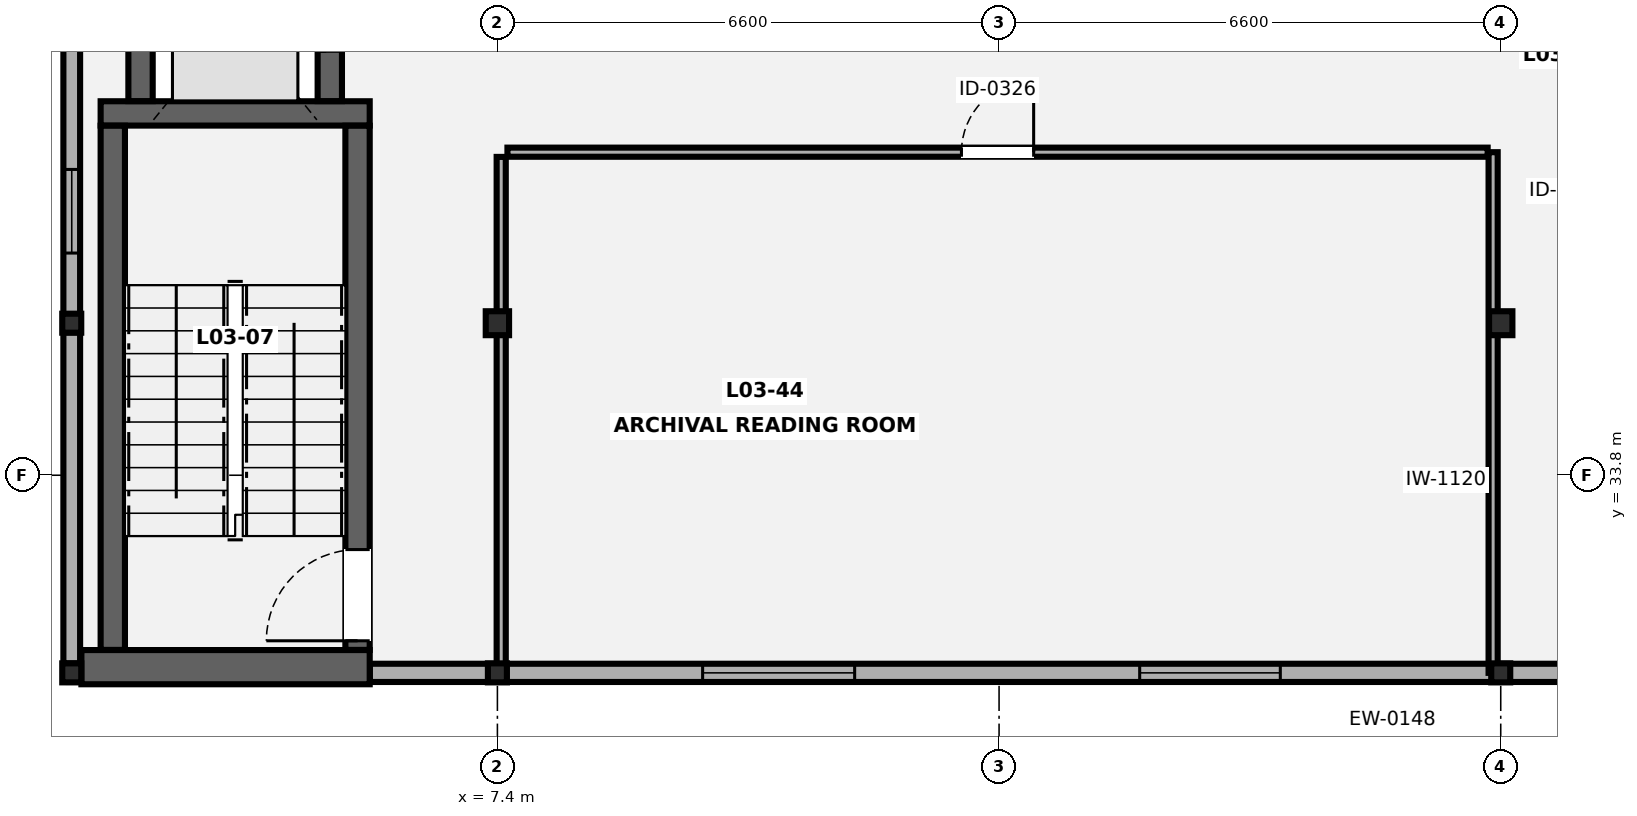
"""IFC4 building model, lengths in metres.
Left out: names, types, materials, properties, quantities, classifications, styles, units other than length and angle.
Written with IfcOpenShell. Run it as: python <this file> out.ifc"""

import sys

from ifc_helpers import new_model, si_unit, direction, frame, frame_2d, origin, origin_2d, place, context, subcontext, project, spatial, rectangle, hollow_rectangle, i_section, extrude, element, fill, save


model = new_model("IFC4")
c1 = context("Model", 3, precision=1e-05, world=origin(), true_north=direction((0.0, 1.0)))
c2 = subcontext(c1, "Body", "Model", "MODEL_VIEW")
j1 = project(units=[si_unit("LENGTHUNIT", "METRE"), si_unit("PLANEANGLEUNIT", "RADIAN")], contexts=[c1])
p1 = place(None, origin())
s1 = spatial("IfcSite", under=j1, at=p1, CompositionType="ELEMENT")
p2 = place(p1, origin())
s2 = spatial("IfcBuilding", under=s1, at=p2, CompositionType="ELEMENT")
p3 = place(p2, frame((0.0, 0.0, 13.3)))
s3 = spatial("IfcBuildingStorey", under=s2, at=p3, CompositionType="ELEMENT", Elevation=13.3)
for number, where, z_axis, x_axis in (
    (1, (1.8, 31.2, 0.0), (0.0, 0.0, 1.0), (1.0, 0.0, 0.0)),
    (2, (1.8, 35.8, 0.0), (0.0, 0.0, 1.0), (1.0, 0.0, 0.0)),
    (3, (7.4, 31.2, 0.0), (0.0, 0.0, 1.0), (1.0, 0.0, 0.0)),
):
    element("IfcColumn", number, at=place(p3, frame(where, z_axis=z_axis, x_axis=x_axis)), inside=s3, PredefinedType="COLUMN", context=c2, shape_type="SweptSolid", body=[
        extrude(hollow_rectangle(XDim=0.25, YDim=0.25, WallThickness=0.012, at=origin_2d()), origin(), (0.0, 0.0, 1.0), 4.2),
    ])
p4 = place(p3, frame((7.4, 35.8, 0.0), z_axis=(0.0, 0.0, 1.0), x_axis=(1.0, 0.0, 0.0)))
e4 = element("IfcColumn", 4, at=p4, inside=s3, PredefinedType="COLUMN", context=c2, shape_type="SweptSolid", body=[
    extrude(i_section(OverallWidth=0.307, OverallDepth=0.315, WebThickness=0.012, FlangeThickness=0.019, FilletRadius=0.017, at=origin_2d()), origin(), (0.0, 0.0, 1.0), 4.2),
])
p5 = place(p3, frame((20.6, 31.2, 0.0), z_axis=(0.0, 0.0, 1.0), x_axis=(1.0, 0.0, 0.0)))
e5 = element("IfcColumn", 5, at=p5, inside=s3, PredefinedType="COLUMN", context=c2, shape_type="SweptSolid", body=[
    extrude(hollow_rectangle(XDim=0.25, YDim=0.25, WallThickness=0.012, at=origin_2d()), origin(), (0.0, 0.0, 1.0), 4.2),
])
p6 = place(p3, frame((20.6, 35.8, 0.0), z_axis=(0.0, 0.0, 1.0), x_axis=(1.0, 0.0, 0.0)))
e6 = element("IfcColumn", 6, at=p6, inside=s3, PredefinedType="COLUMN", context=c2, shape_type="SweptSolid", body=[
    extrude(i_section(OverallWidth=0.307, OverallDepth=0.315, WebThickness=0.012, FlangeThickness=0.019, FilletRadius=0.017, at=origin_2d()), origin(), (0.0, 0.0, 1.0), 4.2),
])
p7 = place(p3, frame((1.8, 31.323, 0.0), z_axis=(0.0, 0.0, 1.0), x_axis=(0.0, 1.0, 0.0)))
e7 = element("IfcWall", 7, at=p7, inside=s3, PredefinedType="SOLIDWALL", context=c2, shape_type="SweptSolid", body=[
    extrude(rectangle(XDim=8.954, YDim=0.22, at=frame_2d((4.477, 0.0))), origin(), (0.0, 0.0, 1.0), 3.445),
])
p8 = place(p7, frame((5.4, 0.0, 0.85)))
e8 = element("IfcOpeningElement", 8, at=p8, cuts=e7, PredefinedType="OPENING", context=c2, shape_type="SweptSolid", body=[
    extrude(rectangle(XDim=1.1, YDim=1.4, at=frame_2d((0.55, 0.7))), frame((0.0, 0.12, 0.0), z_axis=(0.0, -1.0, 0.0), x_axis=(1.0, 0.0, 0.0)), (0.0, 0.0, 1.0), 0.24),
])
p9 = place(p3, frame((27.077, 31.2, 0.0), z_axis=(0.0, 0.0, 1.0), x_axis=(-1.0, 0.0, 0.0)))
e9 = element("IfcWall", 9, at=p9, inside=s3, PredefinedType="SOLIDWALL", context=c2, shape_type="SweptSolid", body=[
    extrude(rectangle(XDim=21.355, YDim=0.24, at=frame_2d((10.677, 0.0))), origin(), (0.0, 0.0, 1.0), 3.505),
])
p10 = place(p9, frame((9.377, 0.0, 0.85)))
e10 = element("IfcOpeningElement", 10, at=p10, cuts=e9, PredefinedType="OPENING", context=c2, shape_type="SweptSolid", body=[
    extrude(rectangle(XDim=1.85, YDim=1.4, at=frame_2d((0.925, 0.7))), frame((0.0, 0.13, 0.0), z_axis=(0.0, -1.0, 0.0), x_axis=(1.0, 0.0, 0.0)), (0.0, 0.0, 1.0), 0.26),
])
p11 = place(p9, frame((14.977, 0.0, 0.85)))
e11 = element("IfcOpeningElement", 11, at=p11, cuts=e9, PredefinedType="OPENING", context=c2, shape_type="SweptSolid", body=[
    extrude(rectangle(XDim=2.0, YDim=1.4, at=frame_2d((1.0, 0.7))), frame((0.0, 0.13, 0.0), z_axis=(0.0, -1.0, 0.0), x_axis=(1.0, 0.0, 0.0)), (0.0, 0.0, 1.0), 0.26),
])
p12 = place(p3, frame((1.927, 31.275, 0.0), z_axis=(0.0, 0.0, 1.0), x_axis=(1.0, 0.0, 0.0)))
e12 = element("IfcWall", 12, at=p12, inside=s3, PredefinedType="SHEAR", context=c2, shape_type="SweptSolid", body=[
    extrude(rectangle(XDim=3.793, YDim=0.45, at=frame_2d((1.896, 0.0))), origin(), (0.0, 0.0, 1.0), 4.0),
])
p13 = place(p3, frame((2.18, 38.56, 0.0), z_axis=(0.0, 0.0, 1.0), x_axis=(1.0, 0.0, 0.0)))
e13 = element("IfcWall", 13, at=p13, inside=s3, PredefinedType="SHEAR", context=c2, shape_type="SweptSolid", body=[
    extrude(rectangle(XDim=3.54, YDim=0.32, at=frame_2d((1.77, 0.0))), origin(), (0.0, 0.0, 1.0), 4.0),
])
p14 = place(p3, frame((2.34, 31.502, 0.0), z_axis=(0.0, 0.0, 1.0), x_axis=(0.0, 1.0, 0.0)))
e14 = element("IfcWall", 14, at=p14, inside=s3, PredefinedType="SHEAR", context=c2, shape_type="SweptSolid", body=[
    extrude(rectangle(XDim=6.896, YDim=0.32, at=frame_2d((3.448, 0.0))), origin(), (0.0, 0.0, 1.0), 4.0),
])
p15 = place(p3, frame((5.56, 31.502, 0.0), z_axis=(0.0, 0.0, 1.0), x_axis=(0.0, 1.0, 0.0)))
e15 = element("IfcWall", 15, at=p15, inside=s3, PredefinedType="SHEAR", context=c2, shape_type="SweptSolid", body=[
    extrude(rectangle(XDim=6.896, YDim=0.32, at=frame_2d((3.448, 0.0))), origin(), (0.0, 0.0, 1.0), 4.0),
])
p16 = place(p15, frame((0.12, 0.0, 0.0)))
e16 = element("IfcOpeningElement", 16, at=p16, cuts=e15, PredefinedType="OPENING", context=c2, shape_type="SweptSolid", body=[
    extrude(rectangle(XDim=1.2, YDim=2.15, at=frame_2d((0.6, 1.075))), frame((0.0, 0.17, 0.0), z_axis=(0.0, -1.0, 0.0), x_axis=(1.0, 0.0, 0.0)), (0.0, 0.0, 1.0), 0.34),
])
p17 = place(p3, frame((2.705, 38.722, 0.0), z_axis=(0.0, 0.0, 1.0), x_axis=(0.0, 1.0, 0.0)))
e17 = element("IfcWall", 17, at=p17, inside=s3, PredefinedType="SHEAR", context=c2, shape_type="SweptSolid", body=[
    extrude(rectangle(XDim=2.411, YDim=0.32, at=frame_2d((1.206, 0.0))), origin(), (0.0, 0.0, 1.0), 4.0),
])
p18 = place(p3, frame((5.195, 38.722, 0.0), z_axis=(0.0, 0.0, 1.0), x_axis=(0.0, 1.0, 0.0)))
e18 = element("IfcWall", 18, at=p18, inside=s3, PredefinedType="SHEAR", context=c2, shape_type="SweptSolid", body=[
    extrude(rectangle(XDim=2.411, YDim=0.32, at=frame_2d((1.206, 0.0))), origin(), (0.0, 0.0, 1.0), 4.0),
])
p19 = place(p18, frame((0.656, 0.0, 0.0)))
e19 = element("IfcOpeningElement", 19, at=p19, cuts=e18, PredefinedType="OPENING", context=c2, shape_type="SweptSolid", body=[
    extrude(rectangle(XDim=1.1, YDim=2.15, at=frame_2d((0.55, 1.075))), frame((0.0, 0.17, 0.0), z_axis=(0.0, -1.0, 0.0), x_axis=(1.0, 0.0, 0.0)), (0.0, 0.0, 1.0), 0.34),
])
p20 = place(p3, frame((7.532, 38.05, 0.0), z_axis=(0.0, 0.0, 1.0), x_axis=(1.0, 0.0, 0.0)))
e20 = element("IfcWall", 20, at=p20, inside=s3, PredefinedType="PARTITIONING", context=c2, shape_type="SweptSolid", body=[
    extrude(rectangle(XDim=12.896, YDim=0.12, at=frame_2d((6.448, 0.0))), origin(), (0.0, 0.0, 1.0), 3.598),
])
p21 = place(p20, frame((5.973, 0.0, 0.0)))
e21 = element("IfcOpeningElement", 21, at=p21, cuts=e20, PredefinedType="OPENING", context=c2, shape_type="SweptSolid", body=[
    extrude(rectangle(XDim=0.95, YDim=2.1, at=frame_2d((0.475, 1.05))), frame((0.0, 0.07, 0.0), z_axis=(0.0, -1.0, 0.0), x_axis=(1.0, 0.0, 0.0)), (0.0, 0.0, 1.0), 0.14),
])
p22 = place(p3, frame((7.45, 31.2, 0.0), z_axis=(0.0, 0.0, 1.0), x_axis=(0.0, 1.0, 0.0)))
e22 = element("IfcWall", 22, at=p22, inside=s3, PredefinedType="PARTITIONING", context=c2, shape_type="SweptSolid", body=[
    extrude(rectangle(XDim=6.788, YDim=0.12, at=frame_2d((3.394, 0.0))), origin(), (0.0, 0.0, 1.0), 3.445),
])
p23 = place(p3, frame((20.5, 31.2, 0.0), z_axis=(0.0, 0.0, 1.0), x_axis=(0.0, 1.0, 0.0)))
e23 = element("IfcWall", 23, at=p23, inside=s3, PredefinedType="PARTITIONING", context=c2, shape_type="SweptSolid", body=[
    extrude(rectangle(XDim=6.85, YDim=0.12, at=frame_2d((3.425, 0.0))), origin(), (0.0, 0.0, 1.0), 3.445),
])
p24 = place(p8, origin())
e24 = element("IfcWindow", 24, at=p24, inside=s3, PartitioningType="SINGLE_PANEL", PredefinedType="WINDOW", context=c2, shape_type="SweptSolid", body=[
    extrude(rectangle(XDim=1.1, YDim=1.4, at=frame_2d((0.55, 0.7))), frame((0.0, 0.03, 0.0), z_axis=(0.0, -1.0, 0.0), x_axis=(1.0, 0.0, 0.0)), (0.0, 0.0, 1.0), 0.06),
])
fill(e8, e24)
p25 = place(p10, origin())
e25 = element("IfcWindow", 25, at=p25, inside=s3, PartitioningType="SINGLE_PANEL", PredefinedType="WINDOW", context=c2, shape_type="SweptSolid", body=[
    extrude(rectangle(XDim=1.85, YDim=1.4, at=frame_2d((0.925, 0.7))), frame((0.0, 0.03, 0.0), z_axis=(0.0, -1.0, 0.0), x_axis=(1.0, 0.0, 0.0)), (0.0, 0.0, 1.0), 0.06),
])
fill(e10, e25)
p26 = place(p11, origin())
e26 = element("IfcWindow", 26, at=p26, inside=s3, PartitioningType="SINGLE_PANEL", PredefinedType="WINDOW", context=c2, shape_type="SweptSolid", body=[
    extrude(rectangle(XDim=2.0, YDim=1.4, at=frame_2d((1.0, 0.7))), frame((0.0, 0.03, 0.0), z_axis=(0.0, -1.0, 0.0), x_axis=(1.0, 0.0, 0.0)), (0.0, 0.0, 1.0), 0.06),
])
fill(e11, e26)
p27 = place(p16, origin())
e27 = element("IfcDoor", 27, at=p27, inside=s3, OperationType="SINGLE_SWING_LEFT", PredefinedType="DOOR", context=c2, shape_type="SweptSolid", body=[
    extrude(rectangle(XDim=1.2, YDim=2.15, at=frame_2d((0.6, 1.075))), frame((0.0, 0.025, 0.0), z_axis=(0.0, -1.0, 0.0), x_axis=(1.0, 0.0, 0.0)), (0.0, 0.0, 1.0), 0.05),
])
fill(e16, e27)
p28 = place(p21, origin())
e28 = element("IfcDoor", 28, at=p28, inside=s3, OperationType="SINGLE_SWING_RIGHT", PredefinedType="DOOR", context=c2, shape_type="SweptSolid", body=[
    extrude(rectangle(XDim=0.95, YDim=2.1, at=frame_2d((0.475, 1.05))), frame((0.0, 0.025, 0.0), z_axis=(0.0, -1.0, 0.0), x_axis=(1.0, 0.0, 0.0)), (0.0, 0.0, 1.0), 0.05),
])
fill(e21, e28)
save(model, sys.argv[1])
